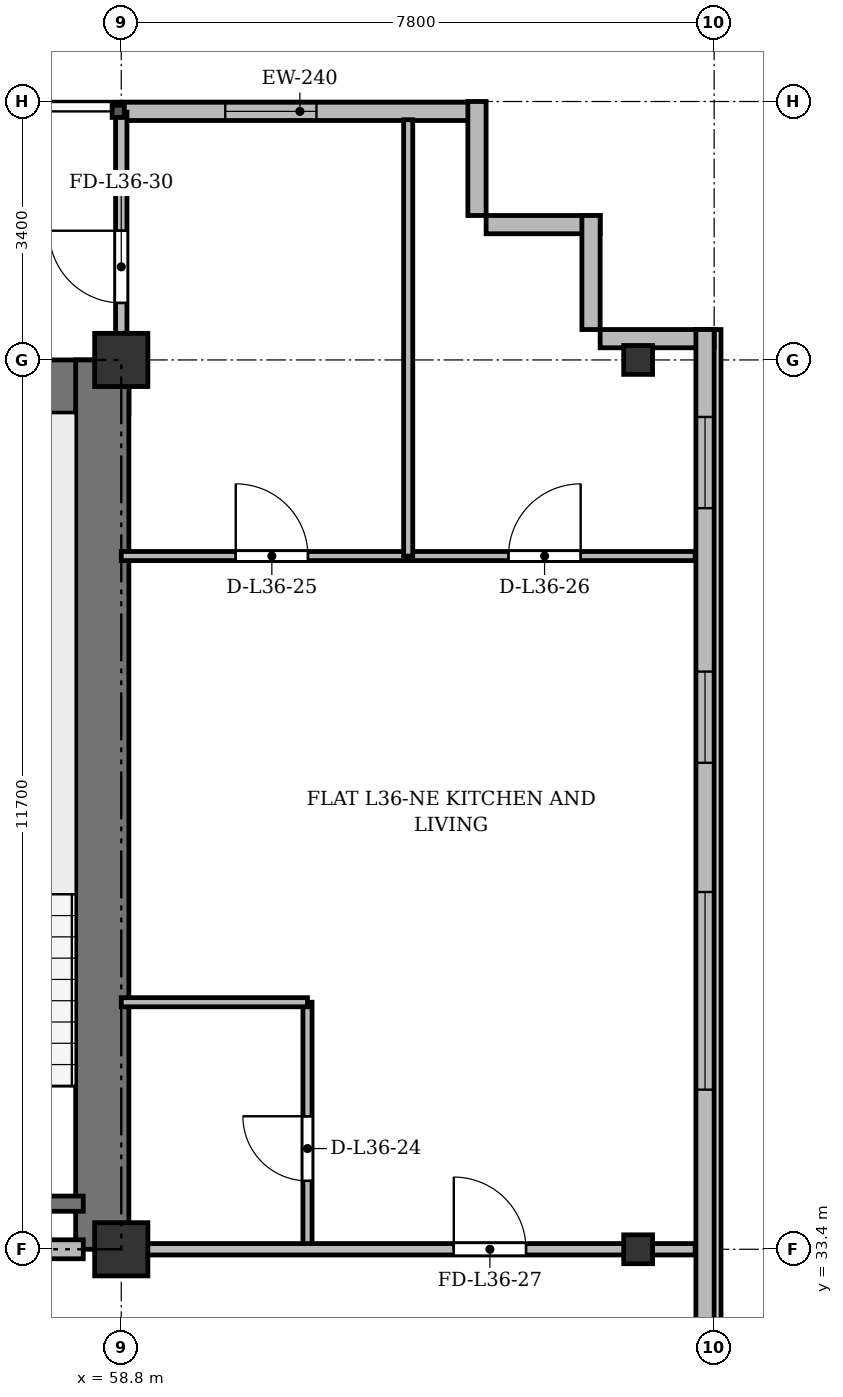
"""IFC4 building model, lengths in metres.
Left out: names, types, materials, properties, quantities, classifications, styles, units other than length and angle.
Written with IfcOpenShell. Run it as: python <this file> out.ifc"""

import sys

from ifc_helpers import new_model, si_unit, direction, frame, frame_2d, origin, origin_2d, place, context, subcontext, project, spatial, rectangle, i_section, extrude, source, transform, mapped, element, fill, save


model = new_model("IFC4")
c1 = context("Model", 3, precision=1e-05, world=origin(), true_north=direction((0.0, 1.0)))
c2 = subcontext(c1, "Body", "Model", "MODEL_VIEW")
j1 = project(units=[si_unit("LENGTHUNIT", "METRE"), si_unit("PLANEANGLEUNIT", "RADIAN")], contexts=[c1])
p1 = place(None, origin())
s1 = spatial("IfcSite", under=j1, at=p1, CompositionType="ELEMENT")
p2 = place(p1, origin())
s2 = spatial("IfcBuilding", under=s1, at=p2, CompositionType="ELEMENT")
p3 = place(p2, frame((0.0, 0.0, 139.3)))
s3 = spatial("IfcBuildingStorey", under=s2, at=p3, CompositionType="ELEMENT", Elevation=139.3)
m1 = source(origin(), c2, "Body", "SweptSolid", [
    extrude(rectangle(XDim=0.7, YDim=0.7, at=origin_2d()), origin(), (0.0, 0.0, 1.0), 3.6),
])
for number, where, z_axis, x_axis in (
    (1, (58.8, 33.4, 0.0), (0.0, 0.0, 1.0), (1.0, 0.0, 0.0)),
    (2, (58.8, 45.1, 0.0), (0.0, 0.0, 1.0), (1.0, 0.0, 0.0)),
):
    element("IfcColumn", number, at=place(p3, frame(where, z_axis=z_axis, x_axis=x_axis)), inside=s3, PredefinedType="COLUMN", context=c2, shape_type="MappedRepresentation", body=[
        mapped(m1, transform((0.0, 0.0, 0.0), x_axis=(1.0, 0.0, 0.0), y_axis=(0.0, 1.0, 0.0), z_axis=(0.0, 0.0, 1.0), scale=1.0)),
    ])
m2 = source(origin(), c2, "Body", "SweptSolid", [
    extrude(i_section(OverallWidth=0.38, OverallDepth=0.38, WebThickness=0.02, FlangeThickness=0.03, at=origin_2d()), origin(), (0.0, 0.0, 1.0), 3.6),
])
for number, where, z_axis, x_axis in (
    (3, (65.6, 33.4, 0.0), (0.0, 0.0, 1.0), (1.0, 0.0, 0.0)),
    (4, (65.6, 45.1, 0.0), (0.0, 0.0, 1.0), (1.0, 0.0, 0.0)),
):
    element("IfcColumn", number, at=place(p3, frame(where, z_axis=z_axis, x_axis=x_axis)), inside=s3, PredefinedType="COLUMN", context=c2, shape_type="MappedRepresentation", body=[
        mapped(m2, transform((0.0, 0.0, 0.0), x_axis=(1.0, 0.0, 0.0), y_axis=(0.0, 1.0, 0.0), z_axis=(0.0, 0.0, 1.0), scale=1.0)),
    ])
p4 = place(p3, frame((58.8, 48.37, 0.0), z_axis=(0.0, 0.0, 1.0), x_axis=(1.0, 0.0, 0.0)))
e5 = element("IfcWall", 5, at=p4, inside=s3, PredefinedType="SOLIDWALL", context=c2, shape_type="SweptSolid", body=[
    extrude(rectangle(XDim=4.7, YDim=0.24, at=frame_2d((2.35, 0.0))), origin(), (0.0, 0.0, 1.0), 3.35),
])
p5 = place(p4, frame((1.368, 0.0, 0.9)))
e6 = element("IfcOpeningElement", 6, at=p5, cuts=e5, PredefinedType="OPENING", context=c2, shape_type="SweptSolid", body=[
    extrude(rectangle(XDim=1.2, YDim=1.65, at=frame_2d((0.6, 0.825))), frame((0.0, 0.13, 0.0), z_axis=(0.0, -1.0, 0.0), x_axis=(1.0, 0.0, 0.0)), (0.0, 0.0, 1.0), 0.26),
])
for number, where, z_axis, x_axis in (
    (7, (63.48, 48.5, 0.0), (0.0, 0.0, 1.0), (0.0, -1.0, 0.0)),
    (8, (63.6, 46.88, 0.0), (0.0, 0.0, 1.0), (1.0, 0.0, 0.0)),
    (9, (64.98, 47.0, 0.0), (0.0, 0.0, 1.0), (0.0, -1.0, 0.0)),
    (10, (65.1, 45.38, 0.0), (0.0, 0.0, 1.0), (1.0, 0.0, 0.0)),
):
    element("IfcWall", number, at=place(p3, frame(where, z_axis=z_axis, x_axis=x_axis)), inside=s3, PredefinedType="SOLIDWALL", context=c2, shape_type="SweptSolid", body=[
        extrude(rectangle(XDim=1.5, YDim=0.24, at=frame_2d((0.75, 0.0))), origin(), (0.0, 0.0, 1.0), 3.35),
    ])
p6 = place(p3, frame((66.48, 45.5, 0.0), z_axis=(0.0, 0.0, 1.0), x_axis=(0.0, -1.0, 0.0)))
e11 = element("IfcWall", 11, at=p6, inside=s3, PredefinedType="SOLIDWALL", context=c2, shape_type="SweptSolid", body=[
    extrude(rectangle(XDim=39.2, YDim=0.24, at=frame_2d((19.6, 0.0))), origin(), (0.0, 0.0, 1.0), 3.35),
])
p7 = place(p6, frame((36.55, 0.0, 0.92)))
e12 = element("IfcOpeningElement", 12, at=p7, cuts=e11, PredefinedType="OPENING", context=c2, shape_type="SweptSolid", body=[
    extrude(rectangle(XDim=1.2, YDim=1.65, at=frame_2d((0.6, 0.825))), frame((0.0, 0.13, 0.0), z_axis=(0.0, -1.0, 0.0), x_axis=(1.0, 0.0, 0.0)), (0.0, 0.0, 1.0), 0.26),
])
p8 = place(p6, frame((32.8, 0.0, 0.92)))
e13 = element("IfcOpeningElement", 13, at=p8, cuts=e11, PredefinedType="OPENING", context=c2, shape_type="SweptSolid", body=[
    extrude(rectangle(XDim=2.6, YDim=1.9, at=frame_2d((1.3, 0.95))), frame((0.0, 0.13, 0.0), z_axis=(0.0, -1.0, 0.0), x_axis=(1.0, 0.0, 0.0)), (0.0, 0.0, 1.0), 0.26),
])
p9 = place(p6, frame((28.6, 0.0, 0.92)))
e14 = element("IfcOpeningElement", 14, at=p9, cuts=e11, PredefinedType="OPENING", context=c2, shape_type="SweptSolid", body=[
    extrude(rectangle(XDim=2.6, YDim=1.9, at=frame_2d((1.3, 0.95))), frame((0.0, 0.13, 0.0), z_axis=(0.0, -1.0, 0.0), x_axis=(1.0, 0.0, 0.0)), (0.0, 0.0, 1.0), 0.26),
])
p10 = place(p6, frame((21.4, 0.0, 0.92)))
e15 = element("IfcOpeningElement", 15, at=p10, cuts=e11, PredefinedType="OPENING", context=c2, shape_type="SweptSolid", body=[
    extrude(rectangle(XDim=2.6, YDim=1.9, at=frame_2d((1.3, 0.95))), frame((0.0, 0.13, 0.0), z_axis=(0.0, -1.0, 0.0), x_axis=(1.0, 0.0, 0.0)), (0.0, 0.0, 1.0), 0.26),
])
p11 = place(p6, frame((7.4, 0.0, 0.92)))
e16 = element("IfcOpeningElement", 16, at=p11, cuts=e11, PredefinedType="OPENING", context=c2, shape_type="SweptSolid", body=[
    extrude(rectangle(XDim=2.6, YDim=1.9, at=frame_2d((1.3, 0.95))), frame((0.0, 0.13, 0.0), z_axis=(0.0, -1.0, 0.0), x_axis=(1.0, 0.0, 0.0)), (0.0, 0.0, 1.0), 0.26),
])
p12 = place(p6, frame((4.5, 0.0, 0.92)))
e17 = element("IfcOpeningElement", 17, at=p12, cuts=e11, PredefinedType="OPENING", context=c2, shape_type="SweptSolid", body=[
    extrude(rectangle(XDim=1.2, YDim=1.65, at=frame_2d((0.6, 0.825))), frame((0.0, 0.13, 0.0), z_axis=(0.0, -1.0, 0.0), x_axis=(1.0, 0.0, 0.0)), (0.0, 0.0, 1.0), 0.26),
])
p13 = place(p6, frame((1.15, 0.0, 0.92)))
e18 = element("IfcOpeningElement", 18, at=p13, cuts=e11, PredefinedType="OPENING", context=c2, shape_type="SweptSolid", body=[
    extrude(rectangle(XDim=1.2, YDim=1.65, at=frame_2d((0.6, 0.825))), frame((0.0, 0.13, 0.0), z_axis=(0.0, -1.0, 0.0), x_axis=(1.0, 0.0, 0.0)), (0.0, 0.0, 1.0), 0.26),
])
p14 = place(p3, frame((15.5, 44.75, 0.0), z_axis=(0.0, 0.0, 1.0), x_axis=(1.0, 0.0, 0.0)))
e19 = element("IfcWall", 19, at=p14, inside=s3, PredefinedType="SHEAR", context=c2, shape_type="SweptSolid", body=[
    extrude(rectangle(XDim=43.4, YDim=0.7, at=frame_2d((21.7, 0.0))), origin(), (0.0, 0.0, 1.0), 3.35),
])
p15 = place(p3, frame((58.55, 33.4, 0.0), z_axis=(0.0, 0.0, 1.0), x_axis=(0.0, 1.0, 0.0)))
e20 = element("IfcWall", 20, at=p15, inside=s3, PredefinedType="SHEAR", context=c2, shape_type="SweptSolid", body=[
    extrude(rectangle(XDim=11.7, YDim=0.7, at=frame_2d((5.85, 0.0))), origin(), (0.0, 0.0, 1.0), 3.35),
])
p16 = place(p3, frame((54.9, 34.0, 0.0), z_axis=(0.0, 0.0, 1.0), x_axis=(1.0, 0.0, 0.0)))
e21 = element("IfcWall", 21, at=p16, inside=s3, PredefinedType="SHEAR", context=c2, shape_type="SweptSolid", body=[
    extrude(rectangle(XDim=3.4, YDim=0.2, at=frame_2d((1.7, 0.0))), origin(), (0.0, 0.0, 1.0), 3.35),
])
p17 = place(p3, frame((47.15, 33.4, 0.0), z_axis=(0.0, 0.0, 1.0), x_axis=(1.0, 0.0, 0.0)))
e22 = element("IfcWall", 22, at=p17, inside=s3, PredefinedType="PARTITIONING", context=c2, shape_type="SweptSolid", body=[
    extrude(rectangle(XDim=11.15, YDim=0.25, at=frame_2d((5.575, 0.0))), origin(), (0.0, 0.0, 1.0), 2.75),
])
p18 = place(p17, frame((0.7, 0.0, 0.0)))
e23 = element("IfcOpeningElement", 23, at=p18, cuts=e22, PredefinedType="OPENING", context=c2, shape_type="SweptSolid", body=[
    extrude(rectangle(XDim=0.95, YDim=2.15, at=frame_2d((0.475, 1.075))), frame((0.0, 0.135, 0.0), z_axis=(0.0, -1.0, 0.0), x_axis=(1.0, 0.0, 0.0)), (0.0, 0.0, 1.0), 0.27),
])
p19 = place(p17, frame((6.0, 0.0, 0.0)))
e24 = element("IfcOpeningElement", 24, at=p19, cuts=e22, PredefinedType="OPENING", context=c2, shape_type="SweptSolid", body=[
    extrude(rectangle(XDim=1.2, YDim=2.15, at=frame_2d((0.6, 1.075))), frame((0.0, 0.135, 0.0), z_axis=(0.0, -1.0, 0.0), x_axis=(1.0, 0.0, 0.0)), (0.0, 0.0, 1.0), 0.27),
])
p20 = place(p3, frame((61.25, 33.4, 0.0), z_axis=(0.0, 0.0, 1.0), x_axis=(0.0, 1.0, 0.0)))
e25 = element("IfcWall", 25, at=p20, inside=s3, PredefinedType="PARTITIONING", context=c2, shape_type="SweptSolid", body=[
    extrude(rectangle(XDim=3.25, YDim=0.12, at=frame_2d((1.625, 0.0))), origin(), (0.0, 0.0, 1.0), 2.75),
])
p21 = place(p20, frame((0.9, 0.0, 0.0)))
e26 = element("IfcOpeningElement", 26, at=p21, cuts=e25, PredefinedType="OPENING", context=c2, shape_type="SweptSolid", body=[
    extrude(rectangle(XDim=0.85, YDim=2.1, at=frame_2d((0.425, 1.05))), frame((0.0, 0.07, 0.0), z_axis=(0.0, -1.0, 0.0), x_axis=(1.0, 0.0, 0.0)), (0.0, 0.0, 1.0), 0.14),
])
p22 = place(p3, frame((58.8, 36.65, 0.0), z_axis=(0.0, 0.0, 1.0), x_axis=(1.0, 0.0, 0.0)))
e27 = element("IfcWall", 27, at=p22, inside=s3, PredefinedType="PARTITIONING", context=c2, shape_type="SweptSolid", body=[
    extrude(rectangle(XDim=2.45, YDim=0.12, at=frame_2d((1.225, 0.0))), origin(), (0.0, 0.0, 1.0), 2.85),
])
p23 = place(p3, frame((58.8, 42.52, 0.0), z_axis=(0.0, 0.0, 1.0), x_axis=(1.0, 0.0, 0.0)))
e28 = element("IfcWall", 28, at=p23, inside=s3, PredefinedType="PARTITIONING", context=c2, shape_type="SweptSolid", body=[
    extrude(rectangle(XDim=3.775, YDim=0.12, at=frame_2d((1.887, 0.0))), origin(), (0.0, 0.0, 1.0), 2.85),
])
p24 = place(p23, frame((1.506, 0.0, 0.0)))
e29 = element("IfcOpeningElement", 29, at=p24, cuts=e28, PredefinedType="OPENING", context=c2, shape_type="SweptSolid", body=[
    extrude(rectangle(XDim=0.95, YDim=2.15, at=frame_2d((0.475, 1.075))), frame((0.0, 0.07, 0.0), z_axis=(0.0, -1.0, 0.0), x_axis=(1.0, 0.0, 0.0)), (0.0, 0.0, 1.0), 0.14),
])
p25 = place(p3, frame((62.575, 42.52, 0.0), z_axis=(0.0, 0.0, 1.0), x_axis=(1.0, 0.0, 0.0)))
e30 = element("IfcWall", 30, at=p25, inside=s3, PredefinedType="PARTITIONING", context=c2, shape_type="SweptSolid", body=[
    extrude(rectangle(XDim=3.775, YDim=0.12, at=frame_2d((1.888, 0.0))), origin(), (0.0, 0.0, 1.0), 2.85),
])
p26 = place(p25, frame((1.319, 0.0, 0.0)))
e31 = element("IfcOpeningElement", 31, at=p26, cuts=e30, PredefinedType="OPENING", context=c2, shape_type="SweptSolid", body=[
    extrude(rectangle(XDim=0.95, YDim=2.15, at=frame_2d((0.475, 1.075))), frame((0.0, 0.07, 0.0), z_axis=(0.0, -1.0, 0.0), x_axis=(1.0, 0.0, 0.0)), (0.0, 0.0, 1.0), 0.14),
])
p27 = place(p3, frame((62.575, 42.52, 0.0), z_axis=(0.0, 0.0, 1.0), x_axis=(0.0, 1.0, 0.0)))
e32 = element("IfcWall", 32, at=p27, inside=s3, PredefinedType="PARTITIONING", context=c2, shape_type="SweptSolid", body=[
    extrude(rectangle(XDim=5.74, YDim=0.12, at=frame_2d((2.87, 0.0))), origin(), (0.0, 0.0, 1.0), 2.75),
])
p28 = place(p3, frame((58.8, 33.4, 0.0), z_axis=(0.0, 0.0, 1.0), x_axis=(1.0, 0.0, 0.0)))
e33 = element("IfcWall", 33, at=p28, inside=s3, PredefinedType="PARTITIONING", context=c2, shape_type="SweptSolid", body=[
    extrude(rectangle(XDim=7.55, YDim=0.15, at=frame_2d((3.775, 0.0))), origin(), (0.0, 0.0, 1.0), 2.75),
])
p29 = place(p28, frame((4.375, 0.0, 0.0)))
e34 = element("IfcOpeningElement", 34, at=p29, cuts=e33, PredefinedType="OPENING", context=c2, shape_type="SweptSolid", body=[
    extrude(rectangle(XDim=0.95, YDim=2.15, at=frame_2d((0.475, 1.075))), frame((0.0, 0.085, 0.0), z_axis=(0.0, -1.0, 0.0), x_axis=(1.0, 0.0, 0.0)), (0.0, 0.0, 1.0), 0.17),
])
p30 = place(p3, frame((58.8, 44.75, 0.0), z_axis=(0.0, 0.0, 1.0), x_axis=(0.0, 1.0, 0.0)))
e35 = element("IfcWall", 35, at=p30, inside=s3, PredefinedType="PARTITIONING", context=c2, shape_type="SweptSolid", body=[
    extrude(rectangle(XDim=3.61, YDim=0.15, at=frame_2d((1.805, 0.0))), origin(), (0.0, 0.0, 1.0), 2.85),
])
p31 = place(p30, frame((1.1, 0.0, 0.0)))
e36 = element("IfcOpeningElement", 36, at=p31, cuts=e35, PredefinedType="OPENING", context=c2, shape_type="SweptSolid", body=[
    extrude(rectangle(XDim=0.95, YDim=2.15, at=frame_2d((0.475, 1.075))), frame((0.0, 0.085, 0.0), z_axis=(0.0, -1.0, 0.0), x_axis=(1.0, 0.0, 0.0)), (0.0, 0.0, 1.0), 0.17),
])
m3 = source(origin(), c2, "Body", "SweptSolid", [
    extrude(rectangle(XDim=1.2, YDim=1.65, at=frame_2d((0.6, 0.825))), frame((0.0, 0.03, 0.0), z_axis=(0.0, -1.0, 0.0), x_axis=(1.0, 0.0, 0.0)), (0.0, 0.0, 1.0), 0.06),
])
p32 = place(p5, origin())
e37 = element("IfcWindow", 37, at=p32, inside=s3, PartitioningType="SINGLE_PANEL", PredefinedType="WINDOW", context=c2, shape_type="MappedRepresentation", body=[
    mapped(m3, transform((0.0, 0.0, 0.0), x_axis=(1.0, 0.0, 0.0), y_axis=(0.0, 1.0, 0.0), z_axis=(0.0, 0.0, 1.0), scale=1.0)),
])
fill(e6, e37)
m4 = source(origin(), c2, "Body", "SweptSolid", [
    extrude(rectangle(XDim=2.6, YDim=1.9, at=frame_2d((1.3, 0.95))), frame((0.0, 0.03, 0.0), z_axis=(0.0, -1.0, 0.0), x_axis=(1.0, 0.0, 0.0)), (0.0, 0.0, 1.0), 0.06),
])
p33 = place(p11, origin())
e38 = element("IfcWindow", 38, at=p33, inside=s3, PartitioningType="SINGLE_PANEL", PredefinedType="WINDOW", context=c2, shape_type="MappedRepresentation", body=[
    mapped(m4, transform((0.0, 0.0, 0.0), x_axis=(1.0, 0.0, 0.0), y_axis=(0.0, 1.0, 0.0), z_axis=(0.0, 0.0, 1.0), scale=1.0)),
])
fill(e16, e38)
p34 = place(p12, origin())
e39 = element("IfcWindow", 39, at=p34, inside=s3, PartitioningType="SINGLE_PANEL", PredefinedType="WINDOW", context=c2, shape_type="MappedRepresentation", body=[
    mapped(m3, transform((0.0, 0.0, 0.0), x_axis=(1.0, 0.0, 0.0), y_axis=(0.0, 1.0, 0.0), z_axis=(0.0, 0.0, 1.0), scale=1.0)),
])
fill(e17, e39)
p35 = place(p13, origin())
e40 = element("IfcWindow", 40, at=p35, inside=s3, PartitioningType="SINGLE_PANEL", PredefinedType="WINDOW", context=c2, shape_type="MappedRepresentation", body=[
    mapped(m3, transform((0.0, 0.0, 0.0), x_axis=(1.0, 0.0, 0.0), y_axis=(0.0, 1.0, 0.0), z_axis=(0.0, 0.0, 1.0), scale=1.0)),
])
fill(e18, e40)
m5 = source(origin(), c2, "Body", "SweptSolid", [
    extrude(rectangle(XDim=0.85, YDim=2.1, at=frame_2d((0.425, 1.05))), frame((0.0, 0.025, 0.0), z_axis=(0.0, -1.0, 0.0), x_axis=(1.0, 0.0, 0.0)), (0.0, 0.0, 1.0), 0.05),
])
p36 = place(p21, origin())
e41 = element("IfcDoor", 41, at=p36, inside=s3, OperationType="SINGLE_SWING_RIGHT", PredefinedType="DOOR", context=c2, shape_type="MappedRepresentation", body=[
    mapped(m5, transform((0.0, 0.0, 0.0), x_axis=(1.0, 0.0, 0.0), y_axis=(0.0, 1.0, 0.0), z_axis=(0.0, 0.0, 1.0), scale=1.0)),
])
fill(e26, e41)
m6 = source(origin(), c2, "Body", "SweptSolid", [
    extrude(rectangle(XDim=0.95, YDim=2.15, at=frame_2d((0.475, 1.075))), frame((0.0, 0.025, 0.0), z_axis=(0.0, -1.0, 0.0), x_axis=(1.0, 0.0, 0.0)), (0.0, 0.0, 1.0), 0.05),
])
p37 = place(p24, origin())
e42 = element("IfcDoor", 42, at=p37, inside=s3, OperationType="SINGLE_SWING_LEFT", PredefinedType="DOOR", context=c2, shape_type="MappedRepresentation", body=[
    mapped(m6, transform((0.0, 0.0, 0.0), x_axis=(1.0, 0.0, 0.0), y_axis=(0.0, 1.0, 0.0), z_axis=(0.0, 0.0, 1.0), scale=1.0)),
])
fill(e29, e42)
p38 = place(p26, origin())
e43 = element("IfcDoor", 43, at=p38, inside=s3, OperationType="SINGLE_SWING_RIGHT", PredefinedType="DOOR", context=c2, shape_type="MappedRepresentation", body=[
    mapped(m6, transform((0.0, 0.0, 0.0), x_axis=(1.0, 0.0, 0.0), y_axis=(0.0, 1.0, 0.0), z_axis=(0.0, 0.0, 1.0), scale=1.0)),
])
fill(e31, e43)
p39 = place(p29, origin())
e44 = element("IfcDoor", 44, at=p39, inside=s3, OperationType="SINGLE_SWING_LEFT", PredefinedType="DOOR", context=c2, shape_type="MappedRepresentation", body=[
    mapped(m6, transform((0.0, 0.0, 0.0), x_axis=(1.0, 0.0, 0.0), y_axis=(0.0, 1.0, 0.0), z_axis=(0.0, 0.0, 1.0), scale=1.0)),
])
fill(e34, e44)
p40 = place(p31, origin())
e45 = element("IfcDoor", 45, at=p40, inside=s3, OperationType="SINGLE_SWING_RIGHT", PredefinedType="DOOR", context=c2, shape_type="MappedRepresentation", body=[
    mapped(m6, transform((0.0, 0.0, 0.0), x_axis=(1.0, 0.0, 0.0), y_axis=(0.0, 1.0, 0.0), z_axis=(0.0, 0.0, 1.0), scale=1.0)),
])
fill(e36, e45)
save(model, sys.argv[1])
